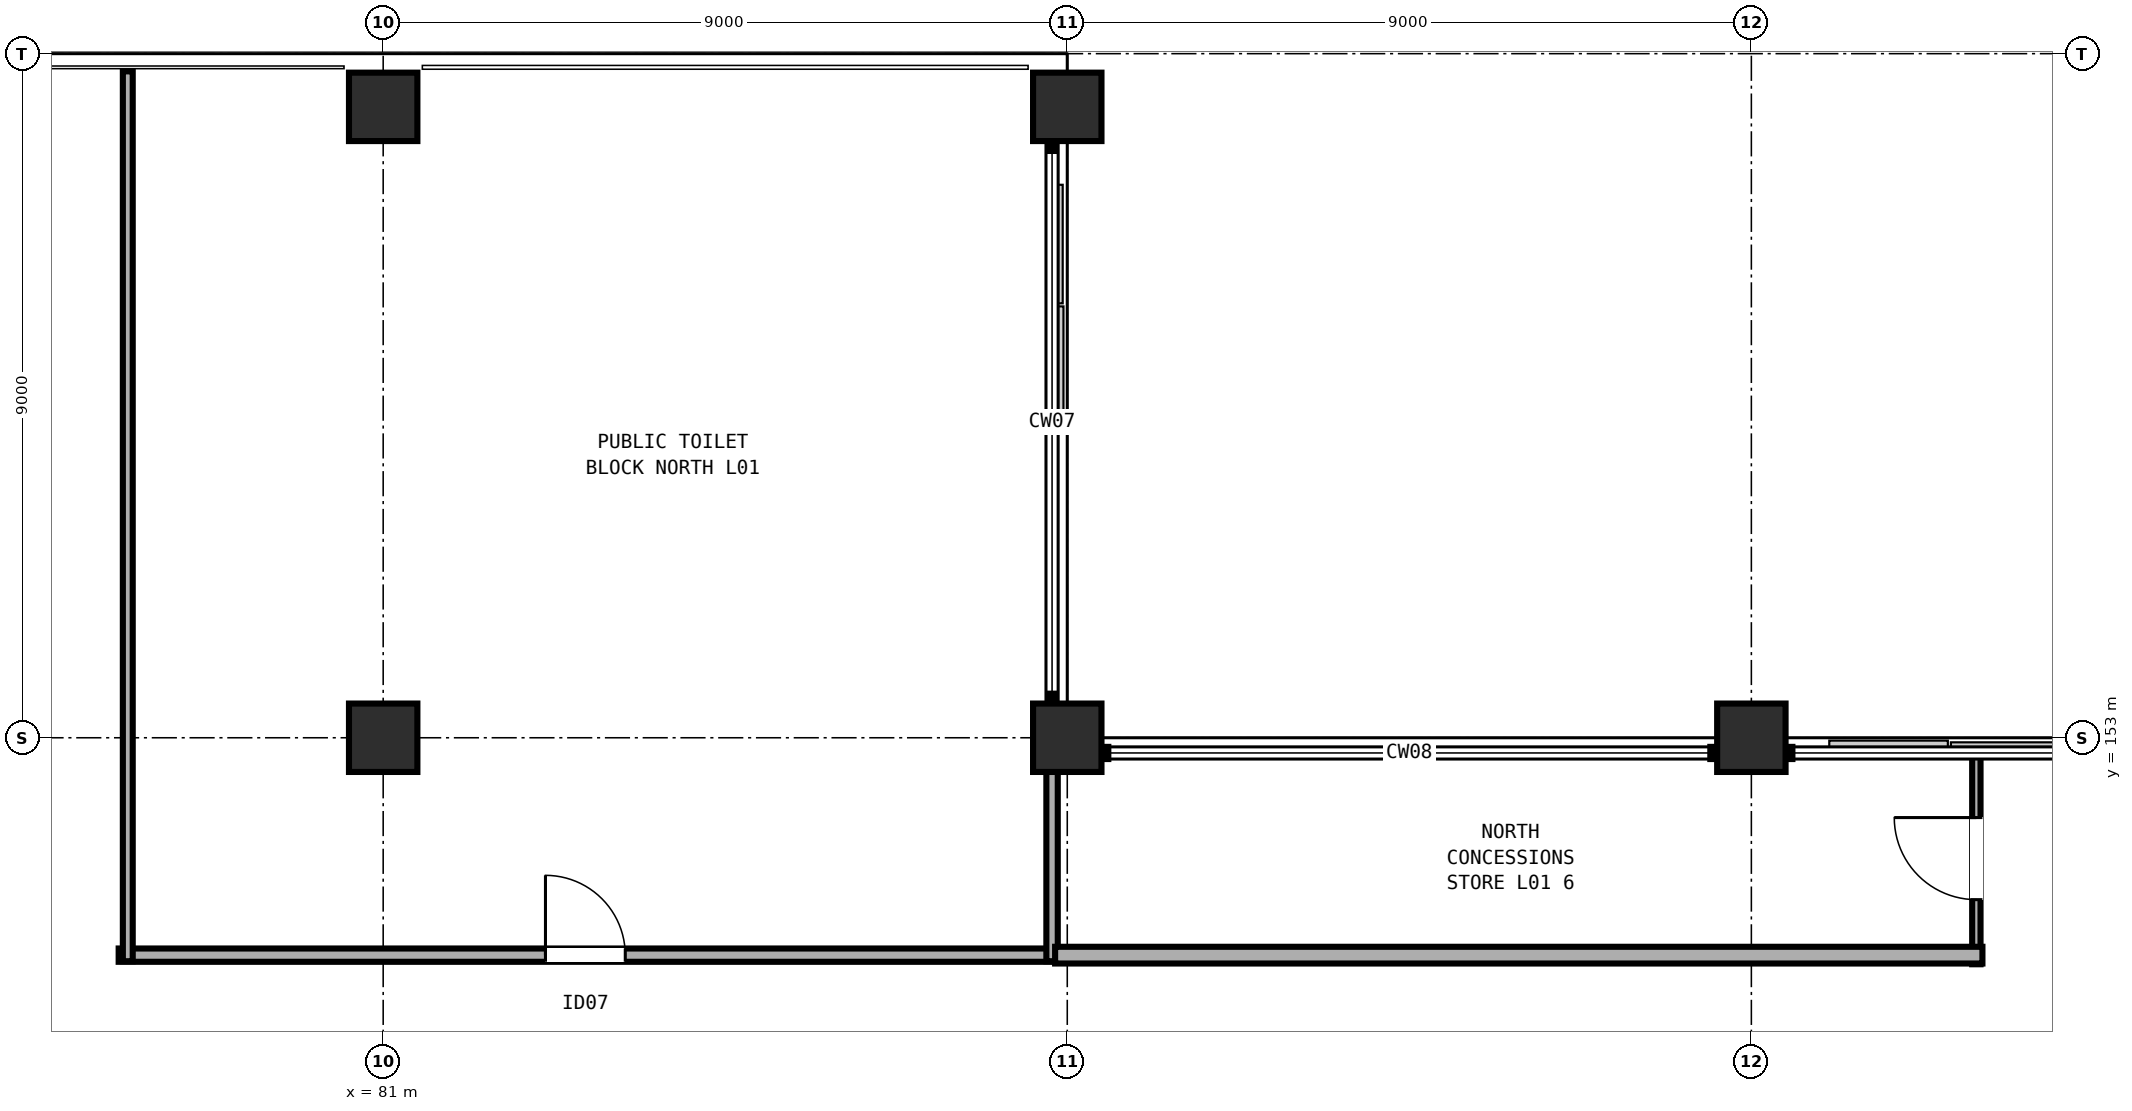
"""IFC4 building model, lengths in metres.
Left out: names, types, materials, properties, quantities, classifications, styles, units other than length and angle.
Written with IfcOpenShell. Run it as: python <this file> out.ifc"""

import sys

from ifc_helpers import new_model, si_unit, direction, frame, frame_2d, origin, origin_2d, place, context, subcontext, project, spatial, rectangle, extrude, element, fill, save


model = new_model("IFC4")
c1 = context("Model", 3, precision=1e-05, world=origin(), true_north=direction((0.0, 1.0)))
c2 = subcontext(c1, "Body", "Model", "MODEL_VIEW")
j1 = project(units=[si_unit("LENGTHUNIT", "METRE"), si_unit("PLANEANGLEUNIT", "RADIAN")], contexts=[c1])
p1 = place(None, origin())
s1 = spatial("IfcSite", under=j1, at=p1, CompositionType="ELEMENT")
p2 = place(p1, origin())
s2 = spatial("IfcBuilding", under=s1, at=p2, CompositionType="ELEMENT")
p3 = place(p2, frame((0.0, 0.0, 4.8)))
s3 = spatial("IfcBuildingStorey", under=s2, at=p3, CompositionType="ELEMENT", Elevation=4.8)
for number, where, z_axis, x_axis in (
    (1, (81.0, 153.0, 0.0), (0.0, 0.0, 1.0), (1.0, 0.0, 0.0)),
    (2, (81.0, 161.3, 0.0), (0.0, 0.0, 1.0), (1.0, 0.0, 0.0)),
    (3, (90.0, 153.0, 0.0), (0.0, 0.0, 1.0), (1.0, 0.0, 0.0)),
    (4, (90.0, 161.3, 0.0), (0.0, 0.0, 1.0), (1.0, 0.0, 0.0)),
    (5, (99.0, 153.0, 0.0), (0.0, 0.0, 1.0), (1.0, 0.0, 0.0)),
):
    element("IfcColumn", number, at=place(p3, frame(where, z_axis=z_axis, x_axis=x_axis)), inside=s3, PredefinedType="COLUMN", context=c2, shape_type="SweptSolid", body=[
        extrude(rectangle(XDim=0.9, YDim=0.9, at=origin_2d()), origin(), (0.0, 0.0, 1.0), 4.8),
    ])
p4 = place(p3, frame((77.52, 150.14, 0.0), z_axis=(0.0, 0.0, 1.0), x_axis=(1.0, 0.0, 0.0)))
e6 = element("IfcWall", 6, at=p4, inside=s3, PredefinedType="PARTITIONING", context=c2, shape_type="SweptSolid", body=[
    extrude(rectangle(XDim=12.28, YDim=0.175, at=frame_2d((6.14, 0.0))), origin(), (0.0, 0.0, 1.0), 3.28),
])
p5 = place(p4, frame((5.615, 0.0, 0.0)))
e7 = element("IfcOpeningElement", 7, at=p5, cuts=e6, PredefinedType="OPENING", context=c2, shape_type="SweptSolid", body=[
    extrude(rectangle(XDim=1.05, YDim=2.1, at=frame_2d((0.525, 1.05))), frame((0.0, 0.097, 0.0), z_axis=(0.0, -1.0, 0.0), x_axis=(1.0, 0.0, 0.0)), (0.0, 0.0, 1.0), 0.195),
])
p6 = place(p3, frame((89.8, 153.08, 0.0), z_axis=(0.0, 0.0, 1.0), x_axis=(0.0, -1.0, 0.0)))
e8 = element("IfcWall", 8, at=p6, inside=s3, PredefinedType="PARTITIONING", context=c2, shape_type="SweptSolid", body=[
    extrude(rectangle(XDim=3.02, YDim=0.15, at=frame_2d((1.51, 0.0))), origin(), (0.0, 0.0, 1.0), 3.28),
])
p7 = place(p3, frame((77.64, 150.06, 0.0), z_axis=(0.0, 0.0, 1.0), x_axis=(0.0, 1.0, 0.0)))
e9 = element("IfcWall", 9, at=p7, inside=s3, PredefinedType="PARTITIONING", context=c2, shape_type="SweptSolid", body=[
    extrude(rectangle(XDim=11.707, YDim=0.13, at=frame_2d((5.854, 0.0))), origin(), (0.0, 0.0, 1.0), 3.28),
])
p8 = place(p3, frame((101.96, 150.02, 0.0), z_axis=(0.0, 0.0, 1.0), x_axis=(0.0, 1.0, 0.0)))
e10 = element("IfcWall", 10, at=p8, inside=s3, PredefinedType="PARTITIONING", context=c2, shape_type="SweptSolid", body=[
    extrude(rectangle(XDim=2.78, YDim=0.11, at=frame_2d((1.39, 0.0))), origin(), (0.0, 0.0, 1.0), 3.28),
])
p9 = place(p8, frame((0.85, 0.0, 0.0)))
e11 = element("IfcOpeningElement", 11, at=p9, cuts=e10, PredefinedType="OPENING", context=c2, shape_type="SweptSolid", body=[
    extrude(rectangle(XDim=1.08, YDim=2.18, at=frame_2d((0.54, 1.09))), frame((0.0, 0.065, 0.0), z_axis=(0.0, -1.0, 0.0), x_axis=(1.0, 0.0, 0.0)), (0.0, 0.0, 1.0), 0.13),
])
p10 = place(p3, frame((102.04, 150.14, 0.0), z_axis=(0.0, 0.0, 1.0), x_axis=(-1.0, 0.0, 0.0)))
e12 = element("IfcWall", 12, at=p10, inside=s3, PredefinedType="PARTITIONING", context=c2, shape_type="SweptSolid", body=[
    extrude(rectangle(XDim=12.2, YDim=0.22, at=frame_2d((6.1, 0.0))), origin(), (0.0, 0.0, 1.0), 3.28),
])
p11 = place(p5, origin())
e13 = element("IfcDoor", 13, at=p11, inside=s3, OperationType="SINGLE_SWING_LEFT", PredefinedType="DOOR", context=c2, shape_type="SweptSolid", body=[
    extrude(rectangle(XDim=1.05, YDim=2.1, at=frame_2d((0.525, 1.05))), frame((0.0, 0.025, 0.0), z_axis=(0.0, -1.0, 0.0), x_axis=(1.0, 0.0, 0.0)), (0.0, 0.0, 1.0), 0.05),
])
fill(e7, e13)
p12 = place(p9, origin())
e14 = element("IfcDoor", 14, at=p12, inside=s3, OperationType="SINGLE_SWING_RIGHT", PredefinedType="DOOR", context=c2, shape_type="SweptSolid", body=[
    extrude(rectangle(XDim=1.08, YDim=2.18, at=frame_2d((0.54, 1.09))), frame((0.0, 0.025, 0.0), z_axis=(0.0, -1.0, 0.0), x_axis=(1.0, 0.0, 0.0)), (0.0, 0.0, 1.0), 0.05),
])
fill(e11, e14)
save(model, sys.argv[1])
